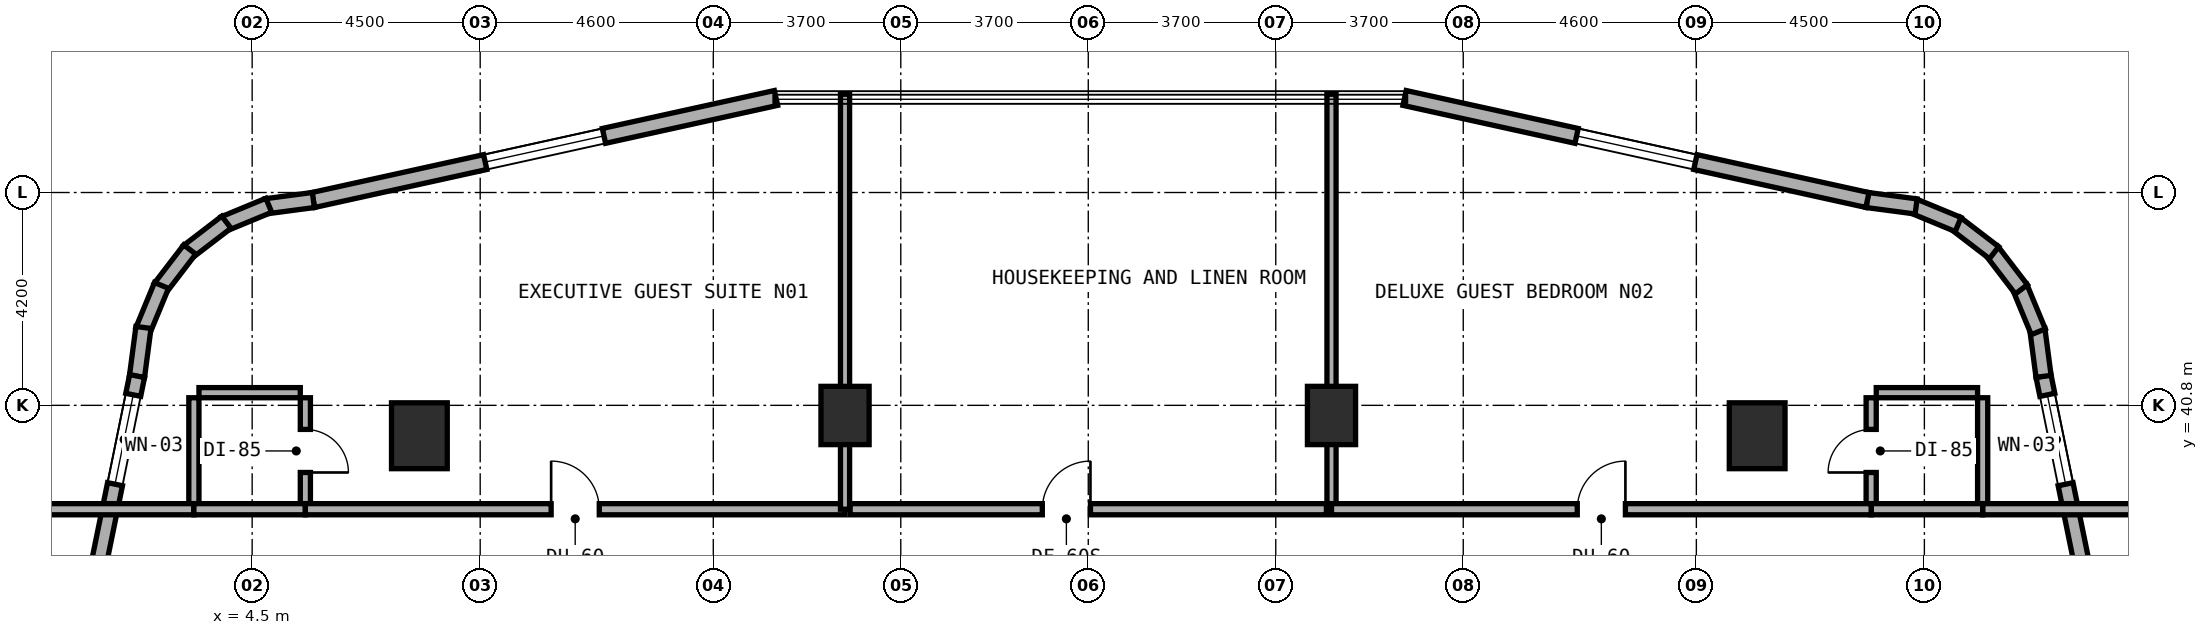
"""IFC4 building model, lengths in metres.
Left out: names, types, materials, properties, quantities, classifications, styles, units other than length and angle.
Written with IfcOpenShell. Run it as: python <this file> out.ifc"""

import sys

from ifc_helpers import new_model, si_unit, direction, frame, frame_2d, origin, origin_2d, place, context, subcontext, project, spatial, rectangle, extrude, element, fill, save


model = new_model("IFC4")
c1 = context("Model", 3, precision=1e-05, world=origin(), true_north=direction((0.0, 1.0)))
c2 = subcontext(c1, "Body", "Model", "MODEL_VIEW")
j1 = project(units=[si_unit("LENGTHUNIT", "METRE"), si_unit("PLANEANGLEUNIT", "RADIAN")], contexts=[c1])
p1 = place(None, origin())
s1 = spatial("IfcSite", under=j1, at=p1, CompositionType="ELEMENT")
p2 = place(p1, origin())
s2 = spatial("IfcBuilding", under=s1, at=p2, CompositionType="ELEMENT")
p3 = place(p2, frame((0.0, 0.0, 24.0)))
s3 = spatial("IfcBuildingStorey", under=s2, at=p3, CompositionType="ELEMENT", Elevation=24.0)
for number, where, z_axis, x_axis in (
    (1, (16.2, 40.6, 0.0), (0.0, 0.0, 1.0), (1.0, 0.0, 0.0)),
    (2, (25.8, 40.6, 0.0), (0.0, 0.0, 1.0), (1.0, 0.0, 0.0)),
):
    element("IfcColumn", number, at=place(p3, frame(where, z_axis=z_axis, x_axis=x_axis)), inside=s3, PredefinedType="COLUMN", context=c2, shape_type="SweptSolid", body=[
        extrude(rectangle(XDim=0.95, YDim=1.15, at=origin_2d()), origin(), (0.0, 0.0, 1.0), 3.5),
    ])
for number, where, z_axis, x_axis in (
    (3, (34.2, 40.2, 0.0), (0.0, 0.0, 1.0), (1.0, 0.0, 0.0)),
    (4, (7.8, 40.2, 0.0), (0.0, 0.0, 1.0), (1.0, 0.0, 0.0)),
):
    element("IfcColumn", number, at=place(p3, frame(where, z_axis=z_axis, x_axis=x_axis)), inside=s3, PredefinedType="COLUMN", context=c2, shape_type="SweptSolid", body=[
        extrude(rectangle(XDim=1.1, YDim=1.3, at=origin_2d()), origin(), (0.0, 0.0, 1.0), 3.5),
    ])
p4 = place(p3, frame((41.858, 31.546, 0.0), z_axis=(0.0, 0.0, 1.0), x_axis=(-0.19998861198, 0.979798221614, 0.0)))
e5 = element("IfcWall", 5, at=p4, inside=s3, PredefinedType="STANDARD", context=c2, shape_type="SweptSolid", body=[
    extrude(rectangle(XDim=10.035, YDim=0.3, at=frame_2d((5.017, 0.0))), origin(), (0.0, 0.0, 1.0), 3.22),
])
p5 = place(p4, frame((2.414, 0.0, 0.8)))
e6 = element("IfcOpeningElement", 6, at=p5, cuts=e5, PredefinedType="OPENING", context=c2, shape_type="SweptSolid", body=[
    extrude(rectangle(XDim=2.4, YDim=1.6, at=frame_2d((1.2, 0.8))), frame((0.0, 0.16, 0.0), z_axis=(0.0, -1.0, 0.0), x_axis=(1.0, 0.0, 0.0)), (0.0, 0.0, 1.0), 0.32),
])
p6 = place(p4, frame((7.856, 0.0, 0.85)))
e7 = element("IfcOpeningElement", 7, at=p6, cuts=e5, PredefinedType="OPENING", context=c2, shape_type="SweptSolid", body=[
    extrude(rectangle(XDim=1.8, YDim=1.5, at=frame_2d((0.9, 0.75))), frame((0.0, 0.16, 0.0), z_axis=(0.0, -1.0, 0.0), x_axis=(1.0, 0.0, 0.0)), (0.0, 0.0, 1.0), 0.32),
])
p7 = place(p3, frame((39.852, 41.372, 0.0), z_axis=(0.0, 0.0, 1.0), x_axis=(-0.131174864804, 0.991359246108, 0.0)))
e8 = element("IfcWall", 8, at=p7, inside=s3, PredefinedType="STANDARD", context=c2, shape_type="SweptSolid", body=[
    extrude(rectangle(XDim=0.938, YDim=0.3, at=frame_2d((0.469, 0.0))), origin(), (0.0, 0.0, 1.0), 3.22),
])
p8 = place(p3, frame((39.748, 42.252, 0.0), z_axis=(0.0, 0.0, 1.0), x_axis=(-0.382344263057, 0.924019948111, 0.0)))
e9 = element("IfcWall", 9, at=p8, inside=s3, PredefinedType="STANDARD", context=c2, shape_type="SweptSolid", body=[
    extrude(rectangle(XDim=0.955, YDim=0.3, at=frame_2d((0.477, 0.0))), origin(), (0.0, 0.0, 1.0), 3.22),
])
p9 = place(p3, frame((39.414, 43.089, 0.0), z_axis=(0.0, 0.0, 1.0), x_axis=(-0.608474481025, 0.793573440799, 0.0)))
e10 = element("IfcWall", 10, at=p9, inside=s3, PredefinedType="STANDARD", context=c2, shape_type="SweptSolid", body=[
    extrude(rectangle(XDim=0.955, YDim=0.3, at=frame_2d((0.478, 0.0))), origin(), (0.0, 0.0, 1.0), 3.22),
])
p10 = place(p3, frame((38.875, 43.812, 0.0), z_axis=(0.0, 0.0, 1.0), x_axis=(-0.793668068435, 0.608351047625, 0.0)))
e11 = element("IfcWall", 11, at=p10, inside=s3, PredefinedType="STANDARD", context=c2, shape_type="SweptSolid", body=[
    extrude(rectangle(XDim=0.955, YDim=0.3, at=frame_2d((0.478, 0.0))), origin(), (0.0, 0.0, 1.0), 3.22),
])
p11 = place(p3, frame((38.166, 44.369, 0.0), z_axis=(0.0, 0.0, 1.0), x_axis=(-0.924019948111, 0.382344263057, 0.0)))
e12 = element("IfcWall", 12, at=p11, inside=s3, PredefinedType="STANDARD", context=c2, shape_type="SweptSolid", body=[
    extrude(rectangle(XDim=0.955, YDim=0.3, at=frame_2d((0.477, 0.0))), origin(), (0.0, 0.0, 1.0), 3.22),
])
p12 = place(p3, frame((37.337, 44.725, 0.0), z_axis=(0.0, 0.0, 1.0), x_axis=(-0.991454295543, 0.130454512571, 0.0)))
e13 = element("IfcWall", 13, at=p12, inside=s3, PredefinedType="STANDARD", context=c2, shape_type="SweptSolid", body=[
    extrude(rectangle(XDim=0.973, YDim=0.3, at=frame_2d((0.487, 0.0))), origin(), (0.0, 0.0, 1.0), 3.22),
])
p13 = place(p3, frame((36.376, 44.852, 0.0), z_axis=(0.0, 0.0, 1.0), x_axis=(-0.97654500432, 0.215313386808, 0.0)))
e14 = element("IfcWall", 14, at=p13, inside=s3, PredefinedType="STANDARD", context=c2, shape_type="SweptSolid", body=[
    extrude(rectangle(XDim=9.354, YDim=0.3, at=frame_2d((4.677, 0.0))), origin(), (0.0, 0.0, 1.0), 3.22),
])
p14 = place(p13, frame((3.477, 0.0, 0.8)))
e15 = element("IfcOpeningElement", 15, at=p14, cuts=e14, PredefinedType="OPENING", context=c2, shape_type="SweptSolid", body=[
    extrude(rectangle(XDim=2.4, YDim=1.6, at=frame_2d((1.2, 0.8))), frame((0.0, 0.16, 0.0), z_axis=(0.0, -1.0, 0.0), x_axis=(1.0, 0.0, 0.0)), (0.0, 0.0, 1.0), 0.32),
])
p15 = place(p3, frame((14.838, 46.866, 0.0), z_axis=(0.0, 0.0, 1.0), x_axis=(-0.9765437942, -0.215318875183, 0.0)))
e16 = element("IfcWall", 16, at=p15, inside=s3, PredefinedType="STANDARD", context=c2, shape_type="SweptSolid", body=[
    extrude(rectangle(XDim=9.353, YDim=0.3, at=frame_2d((4.677, 0.0))), origin(), (0.0, 0.0, 1.0), 3.22),
])
p16 = place(p15, frame((3.477, 0.0, 0.8)))
e17 = element("IfcOpeningElement", 17, at=p16, cuts=e16, PredefinedType="OPENING", context=c2, shape_type="SweptSolid", body=[
    extrude(rectangle(XDim=2.4, YDim=1.6, at=frame_2d((1.2, 0.8))), frame((0.0, 0.16, 0.0), z_axis=(0.0, -1.0, 0.0), x_axis=(1.0, 0.0, 0.0)), (0.0, 0.0, 1.0), 0.32),
])
p17 = place(p3, frame((5.708, 44.852, 0.0), z_axis=(0.0, 0.0, 1.0), x_axis=(-0.991359246108, -0.131174864804, 0.0)))
e18 = element("IfcWall", 18, at=p17, inside=s3, PredefinedType="STANDARD", context=c2, shape_type="SweptSolid", body=[
    extrude(rectangle(XDim=0.938, YDim=0.3, at=frame_2d((0.469, 0.0))), origin(), (0.0, 0.0, 1.0), 3.22),
])
p18 = place(p3, frame((4.828, 44.748, 0.0), z_axis=(0.0, 0.0, 1.0), x_axis=(-0.923982547689, -0.382434636986, 0.0)))
e19 = element("IfcWall", 19, at=p18, inside=s3, PredefinedType="STANDARD", context=c2, shape_type="SweptSolid", body=[
    extrude(rectangle(XDim=0.954, YDim=0.3, at=frame_2d((0.477, 0.0))), origin(), (0.0, 0.0, 1.0), 3.22),
])
for number, where, z_axis, x_axis in (
    (20, (3.991, 44.414, 0.0), (0.0, 0.0, 1.0), (-0.794, -0.608, 0.0)),
    (21, (3.268, 43.875, 0.0), (0.0, 0.0, 1.0), (-0.608, -0.794, 0.0)),
):
    element("IfcWall", number, at=place(p3, frame(where, z_axis=z_axis, x_axis=x_axis)), inside=s3, PredefinedType="STANDARD", context=c2, shape_type="SweptSolid", body=[
        extrude(rectangle(XDim=0.955, YDim=0.3, at=frame_2d((0.478, 0.0))), origin(), (0.0, 0.0, 1.0), 3.22),
    ])
p19 = place(p3, frame((2.711, 43.166, 0.0), z_axis=(0.0, 0.0, 1.0), x_axis=(-0.382344263057, -0.924019948111, 0.0)))
e22 = element("IfcWall", 22, at=p19, inside=s3, PredefinedType="STANDARD", context=c2, shape_type="SweptSolid", body=[
    extrude(rectangle(XDim=0.955, YDim=0.3, at=frame_2d((0.477, 0.0))), origin(), (0.0, 0.0, 1.0), 3.22),
])
p20 = place(p3, frame((2.355, 42.337, 0.0), z_axis=(0.0, 0.0, 1.0), x_axis=(-0.130454512571, -0.991454295543, 0.0)))
e23 = element("IfcWall", 23, at=p20, inside=s3, PredefinedType="STANDARD", context=c2, shape_type="SweptSolid", body=[
    extrude(rectangle(XDim=0.973, YDim=0.3, at=frame_2d((0.487, 0.0))), origin(), (0.0, 0.0, 1.0), 3.22),
])
p21 = place(p3, frame((2.229, 41.378, 0.0), z_axis=(0.0, 0.0, 1.0), x_axis=(-0.199990901713, -0.979797754249, 0.0)))
e24 = element("IfcWall", 24, at=p21, inside=s3, PredefinedType="STANDARD", context=c2, shape_type="SweptSolid", body=[
    extrude(rectangle(XDim=10.065, YDim=0.3, at=frame_2d((5.033, 0.0))), origin(), (0.0, 0.0, 1.0), 3.22),
])
p22 = place(p21, frame((0.378, 0.0, 0.85)))
e25 = element("IfcOpeningElement", 25, at=p22, cuts=e24, PredefinedType="OPENING", context=c2, shape_type="SweptSolid", body=[
    extrude(rectangle(XDim=1.8, YDim=1.5, at=frame_2d((0.9, 0.75))), frame((0.0, 0.16, 0.0), z_axis=(0.0, -1.0, 0.0), x_axis=(1.0, 0.0, 0.0)), (0.0, 0.0, 1.0), 0.32),
])
p23 = place(p21, frame((5.236, 0.0, 0.8)))
e26 = element("IfcOpeningElement", 26, at=p23, cuts=e24, PredefinedType="OPENING", context=c2, shape_type="SweptSolid", body=[
    extrude(rectangle(XDim=2.4, YDim=1.6, at=frame_2d((1.2, 0.8))), frame((0.0, 0.16, 0.0), z_axis=(0.0, -1.0, 0.0), x_axis=(1.0, 0.0, 0.0)), (0.0, 0.0, 1.0), 0.32),
])
p24 = place(p3, frame((5.55, 38.85, 0.0), z_axis=(0.0, 0.0, 1.0), x_axis=(0.0, 1.0, 0.0)))
e27 = element("IfcWall", 27, at=p24, inside=s3, PredefinedType="PLUMBINGWALL", context=c2, shape_type="SweptSolid", body=[
    extrude(rectangle(XDim=2.1, YDim=0.2, at=frame_2d((1.05, 0.0))), origin(), (0.0, 0.0, 1.0), 3.22),
])
p25 = place(p24, frame((0.625, 0.0, 0.0)))
e28 = element("IfcOpeningElement", 28, at=p25, cuts=e27, PredefinedType="OPENING", context=c2, shape_type="SweptSolid", body=[
    extrude(rectangle(XDim=0.85, YDim=2.1, at=frame_2d((0.425, 1.05))), frame((0.0, 0.11, 0.0), z_axis=(0.0, -1.0, 0.0), x_axis=(1.0, 0.0, 0.0)), (0.0, 0.0, 1.0), 0.22),
])
p26 = place(p3, frame((3.45, 41.05, 0.0), z_axis=(0.0, 0.0, 1.0), x_axis=(1.0, 0.0, 0.0)))
e29 = element("IfcWall", 29, at=p26, inside=s3, PredefinedType="PLUMBINGWALL", context=c2, shape_type="SweptSolid", body=[
    extrude(rectangle(XDim=2.0, YDim=0.2, at=frame_2d((1.0, 0.0))), origin(), (0.0, 0.0, 1.0), 3.22),
])
p27 = place(p3, frame((3.35, 38.85, 0.0), z_axis=(0.0, 0.0, 1.0), x_axis=(0.0, 1.0, 0.0)))
e30 = element("IfcWall", 30, at=p27, inside=s3, PredefinedType="PLUMBINGWALL", context=c2, shape_type="SweptSolid", body=[
    extrude(rectangle(XDim=2.1, YDim=0.2, at=frame_2d((1.05, 0.0))), origin(), (0.0, 0.0, 1.0), 3.22),
])
p28 = place(p3, frame((0.24, 38.75, 0.0), z_axis=(0.0, 0.0, 1.0), x_axis=(1.0, 0.0, 0.0)))
e31 = element("IfcWall", 31, at=p28, inside=s3, PredefinedType="SOLIDWALL", context=c2, shape_type="SweptSolid", body=[
    extrude(rectangle(XDim=3.11, YDim=0.22, at=frame_2d((1.555, 0.0))), origin(), (0.0, 0.0, 1.0), 3.22),
])
p29 = place(p3, frame((3.35, 38.75, 0.0), z_axis=(0.0, 0.0, 1.0), x_axis=(1.0, 0.0, 0.0)))
e32 = element("IfcWall", 32, at=p29, inside=s3, PredefinedType="SOLIDWALL", context=c2, shape_type="SweptSolid", body=[
    extrude(rectangle(XDim=2.2, YDim=0.22, at=frame_2d((1.1, 0.0))), origin(), (0.0, 0.0, 1.0), 3.22),
])
p30 = place(p3, frame((5.55, 38.75, 0.0), z_axis=(0.0, 0.0, 1.0), x_axis=(1.0, 0.0, 0.0)))
e33 = element("IfcWall", 33, at=p30, inside=s3, PredefinedType="SOLIDWALL", context=c2, shape_type="SweptSolid", body=[
    extrude(rectangle(XDim=10.65, YDim=0.22, at=frame_2d((5.325, 0.0))), origin(), (0.0, 0.0, 1.0), 2.295),
])
p31 = place(p30, frame((4.85, 0.0, 0.0)))
e34 = element("IfcOpeningElement", 34, at=p31, cuts=e33, PredefinedType="OPENING", context=c2, shape_type="SweptSolid", body=[
    extrude(rectangle(XDim=0.95, YDim=2.1, at=frame_2d((0.475, 1.05))), frame((0.0, 0.12, 0.0), z_axis=(0.0, -1.0, 0.0), x_axis=(1.0, 0.0, 0.0)), (0.0, 0.0, 1.0), 0.24),
])
p32 = place(p3, frame((16.2, 38.75, 0.0), z_axis=(0.0, 0.0, 1.0), x_axis=(0.0, 1.0, 0.0)))
e35 = element("IfcWall", 35, at=p32, inside=s3, PredefinedType="SOLIDWALL", context=c2, shape_type="SweptSolid", body=[
    extrude(rectangle(XDim=8.19, YDim=0.18, at=frame_2d((4.095, 0.0))), origin(), (0.0, 0.0, 1.0), 2.295),
])
p33 = place(p3, frame((16.3, 38.75, 0.0), z_axis=(0.0, 0.0, 1.0), x_axis=(1.0, 0.0, 0.0)))
e36 = element("IfcWall", 36, at=p33, inside=s3, PredefinedType="SOLIDWALL", context=c2, shape_type="SweptSolid", body=[
    extrude(rectangle(XDim=9.4, YDim=0.22, at=frame_2d((4.7, 0.0))), origin(), (0.0, 0.0, 1.0), 2.955),
])
p34 = place(p33, frame((3.793, 0.0, 0.0)))
e37 = element("IfcOpeningElement", 37, at=p34, cuts=e36, PredefinedType="OPENING", context=c2, shape_type="SweptSolid", body=[
    extrude(rectangle(XDim=0.95, YDim=2.1, at=frame_2d((0.475, 1.05))), frame((0.0, 0.12, 0.0), z_axis=(0.0, -1.0, 0.0), x_axis=(1.0, 0.0, 0.0)), (0.0, 0.0, 1.0), 0.24),
])
p35 = place(p3, frame((25.8, 38.75, 0.0), z_axis=(0.0, 0.0, 1.0), x_axis=(0.0, 1.0, 0.0)))
e38 = element("IfcWall", 38, at=p35, inside=s3, PredefinedType="SOLIDWALL", context=c2, shape_type="SweptSolid", body=[
    extrude(rectangle(XDim=8.19, YDim=0.18, at=frame_2d((4.095, 0.0))), origin(), (0.0, 0.0, 1.0), 2.295),
])
p36 = place(p3, frame((36.45, 38.85, 0.0), z_axis=(0.0, 0.0, 1.0), x_axis=(0.0, 1.0, 0.0)))
e39 = element("IfcWall", 39, at=p36, inside=s3, PredefinedType="PLUMBINGWALL", context=c2, shape_type="SweptSolid", body=[
    extrude(rectangle(XDim=2.1, YDim=0.2, at=frame_2d((1.05, 0.0))), origin(), (0.0, 0.0, 1.0), 3.22),
])
p37 = place(p36, frame((0.625, 0.0, 0.0)))
e40 = element("IfcOpeningElement", 40, at=p37, cuts=e39, PredefinedType="OPENING", context=c2, shape_type="SweptSolid", body=[
    extrude(rectangle(XDim=0.85, YDim=2.1, at=frame_2d((0.425, 1.05))), frame((0.0, 0.11, 0.0), z_axis=(0.0, -1.0, 0.0), x_axis=(1.0, 0.0, 0.0)), (0.0, 0.0, 1.0), 0.22),
])
p38 = place(p3, frame((36.55, 41.05, 0.0), z_axis=(0.0, 0.0, 1.0), x_axis=(1.0, 0.0, 0.0)))
e41 = element("IfcWall", 41, at=p38, inside=s3, PredefinedType="PLUMBINGWALL", context=c2, shape_type="SweptSolid", body=[
    extrude(rectangle(XDim=2.0, YDim=0.2, at=frame_2d((1.0, 0.0))), origin(), (0.0, 0.0, 1.0), 3.22),
])
p39 = place(p3, frame((38.65, 38.85, 0.0), z_axis=(0.0, 0.0, 1.0), x_axis=(0.0, 1.0, 0.0)))
e42 = element("IfcWall", 42, at=p39, inside=s3, PredefinedType="PLUMBINGWALL", context=c2, shape_type="SweptSolid", body=[
    extrude(rectangle(XDim=2.1, YDim=0.2, at=frame_2d((1.05, 0.0))), origin(), (0.0, 0.0, 1.0), 3.22),
])
p40 = place(p3, frame((38.65, 38.75, 0.0), z_axis=(0.0, 0.0, 1.0), x_axis=(1.0, 0.0, 0.0)))
e43 = element("IfcWall", 43, at=p40, inside=s3, PredefinedType="SOLIDWALL", context=c2, shape_type="SweptSolid", body=[
    extrude(rectangle(XDim=3.19, YDim=0.22, at=frame_2d((1.595, 0.0))), origin(), (0.0, 0.0, 1.0), 3.22),
])
p41 = place(p3, frame((36.45, 38.75, 0.0), z_axis=(0.0, 0.0, 1.0), x_axis=(1.0, 0.0, 0.0)))
e44 = element("IfcWall", 44, at=p41, inside=s3, PredefinedType="SOLIDWALL", context=c2, shape_type="SweptSolid", body=[
    extrude(rectangle(XDim=2.2, YDim=0.22, at=frame_2d((1.1, 0.0))), origin(), (0.0, 0.0, 1.0), 3.22),
])
p42 = place(p3, frame((25.8, 38.75, 0.0), z_axis=(0.0, 0.0, 1.0), x_axis=(1.0, 0.0, 0.0)))
e45 = element("IfcWall", 45, at=p42, inside=s3, PredefinedType="SOLIDWALL", context=c2, shape_type="SweptSolid", body=[
    extrude(rectangle(XDim=10.65, YDim=0.22, at=frame_2d((5.325, 0.0))), origin(), (0.0, 0.0, 1.0), 2.295),
])
p43 = place(p42, frame((4.85, 0.0, 0.0)))
e46 = element("IfcOpeningElement", 46, at=p43, cuts=e45, PredefinedType="OPENING", context=c2, shape_type="SweptSolid", body=[
    extrude(rectangle(XDim=0.95, YDim=2.1, at=frame_2d((0.475, 1.05))), frame((0.0, 0.12, 0.0), z_axis=(0.0, -1.0, 0.0), x_axis=(1.0, 0.0, 0.0)), (0.0, 0.0, 1.0), 0.24),
])
p44 = place(p6, origin())
e47 = element("IfcWindow", 47, at=p44, inside=s3, PartitioningType="SINGLE_PANEL", PredefinedType="WINDOW", context=c2, shape_type="SweptSolid", body=[
    extrude(rectangle(XDim=1.8, YDim=1.5, at=frame_2d((0.9, 0.75))), frame((0.0, 0.03, 0.0), z_axis=(0.0, -1.0, 0.0), x_axis=(1.0, 0.0, 0.0)), (0.0, 0.0, 1.0), 0.06),
])
fill(e7, e47)
p45 = place(p14, origin())
e48 = element("IfcWindow", 48, at=p45, inside=s3, PartitioningType="SINGLE_PANEL", PredefinedType="WINDOW", context=c2, shape_type="SweptSolid", body=[
    extrude(rectangle(XDim=2.4, YDim=1.6, at=frame_2d((1.2, 0.8))), frame((0.0, 0.03, 0.0), z_axis=(0.0, -1.0, 0.0), x_axis=(1.0, 0.0, 0.0)), (0.0, 0.0, 1.0), 0.06),
])
fill(e15, e48)
p46 = place(p16, origin())
e49 = element("IfcWindow", 49, at=p46, inside=s3, PartitioningType="SINGLE_PANEL", PredefinedType="WINDOW", context=c2, shape_type="SweptSolid", body=[
    extrude(rectangle(XDim=2.4, YDim=1.6, at=frame_2d((1.2, 0.8))), frame((0.0, 0.03, 0.0), z_axis=(0.0, -1.0, 0.0), x_axis=(1.0, 0.0, 0.0)), (0.0, 0.0, 1.0), 0.06),
])
fill(e17, e49)
p47 = place(p22, origin())
e50 = element("IfcWindow", 50, at=p47, inside=s3, PartitioningType="SINGLE_PANEL", PredefinedType="WINDOW", context=c2, shape_type="SweptSolid", body=[
    extrude(rectangle(XDim=1.8, YDim=1.5, at=frame_2d((0.9, 0.75))), frame((0.0, 0.03, 0.0), z_axis=(0.0, -1.0, 0.0), x_axis=(1.0, 0.0, 0.0)), (0.0, 0.0, 1.0), 0.06),
])
fill(e25, e50)
p48 = place(p25, frame((0.85, 0.0, 0.0), z_axis=(0.0, 0.0, 1.0), x_axis=(-1.0, 0.0, 0.0)))
e51 = element("IfcDoor", 51, at=p48, inside=s3, OperationType="SINGLE_SWING_RIGHT", PredefinedType="DOOR", context=c2, shape_type="SweptSolid", body=[
    extrude(rectangle(XDim=0.85, YDim=2.1, at=frame_2d((0.425, 1.05))), frame((0.0, 0.025, 0.0), z_axis=(0.0, -1.0, 0.0), x_axis=(1.0, 0.0, 0.0)), (0.0, 0.0, 1.0), 0.05),
])
fill(e28, e51)
p49 = place(p31, origin())
e52 = element("IfcDoor", 52, at=p49, inside=s3, OperationType="SINGLE_SWING_LEFT", PredefinedType="DOOR", context=c2, shape_type="SweptSolid", body=[
    extrude(rectangle(XDim=0.95, YDim=2.1, at=frame_2d((0.475, 1.05))), frame((0.0, 0.025, 0.0), z_axis=(0.0, -1.0, 0.0), x_axis=(1.0, 0.0, 0.0)), (0.0, 0.0, 1.0), 0.05),
])
fill(e34, e52)
p50 = place(p34, origin())
e53 = element("IfcDoor", 53, at=p50, inside=s3, OperationType="SINGLE_SWING_RIGHT", PredefinedType="DOOR", context=c2, shape_type="SweptSolid", body=[
    extrude(rectangle(XDim=0.95, YDim=2.1, at=frame_2d((0.475, 1.05))), frame((0.0, 0.025, 0.0), z_axis=(0.0, -1.0, 0.0), x_axis=(1.0, 0.0, 0.0)), (0.0, 0.0, 1.0), 0.05),
])
fill(e37, e53)
p51 = place(p37, origin())
e54 = element("IfcDoor", 54, at=p51, inside=s3, OperationType="SINGLE_SWING_LEFT", PredefinedType="DOOR", context=c2, shape_type="SweptSolid", body=[
    extrude(rectangle(XDim=0.85, YDim=2.1, at=frame_2d((0.425, 1.05))), frame((0.0, 0.025, 0.0), z_axis=(0.0, -1.0, 0.0), x_axis=(1.0, 0.0, 0.0)), (0.0, 0.0, 1.0), 0.05),
])
fill(e40, e54)
p52 = place(p43, origin())
e55 = element("IfcDoor", 55, at=p52, inside=s3, OperationType="SINGLE_SWING_RIGHT", PredefinedType="DOOR", context=c2, shape_type="SweptSolid", body=[
    extrude(rectangle(XDim=0.95, YDim=2.1, at=frame_2d((0.475, 1.05))), frame((0.0, 0.025, 0.0), z_axis=(0.0, -1.0, 0.0), x_axis=(1.0, 0.0, 0.0)), (0.0, 0.0, 1.0), 0.05),
])
fill(e46, e55)
save(model, sys.argv[1])
